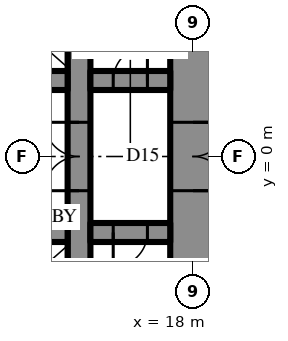
"""IFC4 building model, lengths in metres.
Left out: names, types, materials, properties, quantities, classifications, styles, units other than length and angle.
Written with IfcOpenShell. Run it as: python <this file> out.ifc"""

import sys

from ifc_helpers import new_model, si_unit, direction, frame, frame_2d, origin, place, context, subcontext, project, spatial, rectangle, extrude, element, fill, save


model = new_model("IFC4")
c1 = context("Model", 3, precision=1e-05, world=origin(), true_north=direction((0.0, 1.0)))
c2 = subcontext(c1, "Body", "Model", "MODEL_VIEW")
j1 = project(units=[si_unit("LENGTHUNIT", "METRE"), si_unit("PLANEANGLEUNIT", "RADIAN")], contexts=[c1])
p1 = place(None, origin())
s1 = spatial("IfcSite", under=j1, at=p1, CompositionType="ELEMENT")
p2 = place(p1, origin())
s2 = spatial("IfcBuilding", under=s1, at=p2, CompositionType="ELEMENT")
p3 = place(p2, frame((0.0, 0.0, 127.9)))
s3 = spatial("IfcBuildingStorey", under=s2, at=p3, CompositionType="ELEMENT", Elevation=127.9)
p4 = place(p3, frame((18.0, -10.7, 0.0), z_axis=(0.0, 0.0, 1.0), x_axis=(0.0, 1.0, 0.0)))
e1 = element("IfcWall", 1, at=p4, inside=s3, PredefinedType="SHEAR", context=c2, shape_type="SweptSolid", body=[
    extrude(rectangle(XDim=21.4, YDim=1.2, at=frame_2d((10.7, 0.0))), origin(), (0.0, 0.0, 1.0), 4.2),
])
p5 = place(p4, frame((9.8, 0.0, 0.0)))
e2 = element("IfcOpeningElement", 2, at=p5, cuts=e1, PredefinedType="OPENING", context=c2, shape_type="SweptSolid", body=[
    extrude(rectangle(XDim=1.8, YDim=2.4, at=frame_2d((0.9, 1.2))), frame((0.0, 0.61, 0.0), z_axis=(0.0, -1.0, 0.0), x_axis=(1.0, 0.0, 0.0)), (0.0, 0.0, 1.0), 1.22),
])
p6 = place(p3, frame((15.0, -10.7, 0.0), z_axis=(0.0, 0.0, 1.0), x_axis=(0.0, 1.0, 0.0)))
e3 = element("IfcWall", 3, at=p6, inside=s3, PredefinedType="SHEAR", context=c2, shape_type="SweptSolid", body=[
    extrude(rectangle(XDim=21.4, YDim=0.6, at=frame_2d((10.7, 0.0))), origin(), (0.0, 0.0, 1.0), 4.2),
])
p7 = place(p6, frame((9.8, 0.0, 0.0)))
e4 = element("IfcOpeningElement", 4, at=p7, cuts=e3, PredefinedType="OPENING", context=c2, shape_type="SweptSolid", body=[
    extrude(rectangle(XDim=1.8, YDim=2.4, at=frame_2d((0.9, 1.2))), frame((0.0, 0.31, 0.0), z_axis=(0.0, -1.0, 0.0), x_axis=(1.0, 0.0, 0.0)), (0.0, 0.0, 1.0), 0.62),
])
p8 = place(p3, frame((12.3, 2.0, 0.0), z_axis=(0.0, 0.0, 1.0), x_axis=(1.0, 0.0, 0.0)))
e5 = element("IfcWall", 5, at=p8, inside=s3, PredefinedType="SHEAR", context=c2, shape_type="SweptSolid", body=[
    extrude(rectangle(XDim=2.4, YDim=0.5, at=frame_2d((1.2, 0.0))), origin(), (0.0, 0.0, 1.0), 4.2),
])
p9 = place(p3, frame((15.3, 2.0, 0.0), z_axis=(0.0, 0.0, 1.0), x_axis=(1.0, 0.0, 0.0)))
e6 = element("IfcWall", 6, at=p9, inside=s3, PredefinedType="SHEAR", context=c2, shape_type="SweptSolid", body=[
    extrude(rectangle(XDim=2.1, YDim=0.5, at=frame_2d((1.05, 0.0))), origin(), (0.0, 0.0, 1.0), 4.2),
])
p10 = place(p9, frame((0.6, 0.0, 0.0)))
e7 = element("IfcOpeningElement", 7, at=p10, cuts=e6, PredefinedType="OPENING", context=c2, shape_type="SweptSolid", body=[
    extrude(rectangle(XDim=0.9, YDim=2.2, at=frame_2d((0.45, 1.1))), frame((0.0, 0.26, 0.0), z_axis=(0.0, -1.0, 0.0), x_axis=(1.0, 0.0, 0.0)), (0.0, 0.0, 1.0), 0.52),
])
p11 = place(p3, frame((17.4, -2.0, 0.0), z_axis=(0.0, 0.0, 1.0), x_axis=(-1.0, 0.0, 0.0)))
e8 = element("IfcWall", 8, at=p11, inside=s3, PredefinedType="SHEAR", context=c2, shape_type="SweptSolid", body=[
    extrude(rectangle(XDim=2.1, YDim=0.5, at=frame_2d((1.05, 0.0))), origin(), (0.0, 0.0, 1.0), 4.2),
])
p12 = place(p11, frame((0.6, 0.0, 0.0)))
e9 = element("IfcOpeningElement", 9, at=p12, cuts=e8, PredefinedType="OPENING", context=c2, shape_type="SweptSolid", body=[
    extrude(rectangle(XDim=0.9, YDim=2.2, at=frame_2d((0.45, 1.1))), frame((0.0, 0.26, 0.0), z_axis=(0.0, -1.0, 0.0), x_axis=(1.0, 0.0, 0.0)), (0.0, 0.0, 1.0), 0.52),
])
p13 = place(p3, frame((14.7, -2.0, 0.0), z_axis=(0.0, 0.0, 1.0), x_axis=(-1.0, 0.0, 0.0)))
e10 = element("IfcWall", 10, at=p13, inside=s3, PredefinedType="SHEAR", context=c2, shape_type="SweptSolid", body=[
    extrude(rectangle(XDim=2.4, YDim=0.5, at=frame_2d((1.2, 0.0))), origin(), (0.0, 0.0, 1.0), 4.2),
])
p14 = place(p5, frame((1.8, 0.0, 0.0), z_axis=(0.0, 0.0, 1.0), x_axis=(-1.0, 0.0, 0.0)))
e11 = element("IfcDoor", 11, at=p14, inside=s3, OperationType="DOUBLE_DOOR_SINGLE_SWING", PredefinedType="DOOR", context=c2, shape_type="SweptSolid", body=[
    extrude(rectangle(XDim=1.8, YDim=2.4, at=frame_2d((0.9, 1.2))), frame((0.0, 0.025, 0.0), z_axis=(0.0, -1.0, 0.0), x_axis=(1.0, 0.0, 0.0)), (0.0, 0.0, 1.0), 0.05),
])
fill(e2, e11)
p15 = place(p10, origin())
e12 = element("IfcDoor", 12, at=p15, inside=s3, OperationType="SINGLE_SWING_LEFT", PredefinedType="DOOR", context=c2, shape_type="SweptSolid", body=[
    extrude(rectangle(XDim=0.9, YDim=2.2, at=frame_2d((0.45, 1.1))), frame((0.0, 0.025, 0.0), z_axis=(0.0, -1.0, 0.0), x_axis=(1.0, 0.0, 0.0)), (0.0, 0.0, 1.0), 0.05),
])
fill(e7, e12)
p16 = place(p12, origin())
e13 = element("IfcDoor", 13, at=p16, inside=s3, OperationType="SINGLE_SWING_LEFT", PredefinedType="DOOR", context=c2, shape_type="SweptSolid", body=[
    extrude(rectangle(XDim=0.9, YDim=2.2, at=frame_2d((0.45, 1.1))), frame((0.0, 0.025, 0.0), z_axis=(0.0, -1.0, 0.0), x_axis=(1.0, 0.0, 0.0)), (0.0, 0.0, 1.0), 0.05),
])
fill(e9, e13)
p17 = place(p7, origin())
e14 = element("IfcDoor", 14, at=p17, inside=s3, OperationType="DOUBLE_DOOR_SINGLE_SWING", PredefinedType="DOOR", context=c2, shape_type="SweptSolid", body=[
    extrude(rectangle(XDim=1.8, YDim=2.4, at=frame_2d((0.9, 1.2))), frame((0.0, 0.025, 0.0), z_axis=(0.0, -1.0, 0.0), x_axis=(1.0, 0.0, 0.0)), (0.0, 0.0, 1.0), 0.05),
])
fill(e4, e14)
save(model, sys.argv[1])
